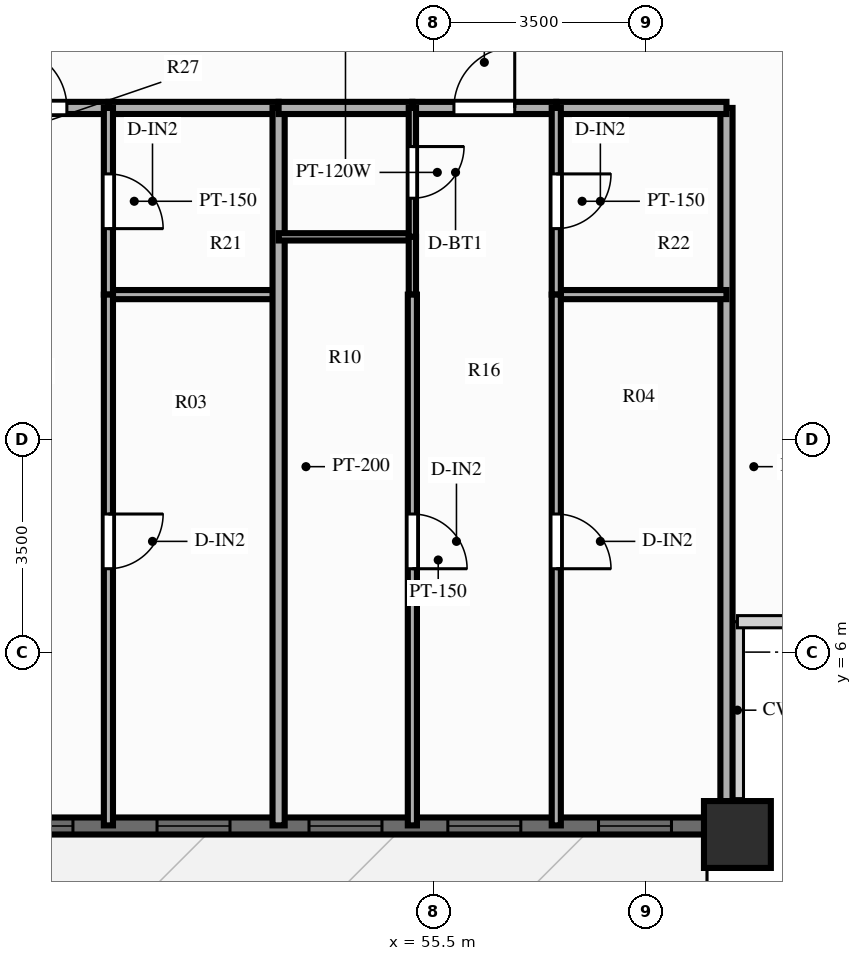
"""IFC4 building model, lengths in metres.
Left out: names, types, materials, properties, quantities, classifications, styles, units other than length and angle.
Written with IfcOpenShell. Run it as: python <this file> out.ifc"""

import sys

from ifc_helpers import new_model, si_unit, direction, frame, frame_2d, origin, origin_2d, place, context, subcontext, project, spatial, rectangle, extrude, source, transform, mapped, element, fill, save


model = new_model("IFC4")
c1 = context("Model", 3, precision=1e-05, world=origin(), true_north=direction((0.0, 1.0)))
c2 = subcontext(c1, "Body", "Model", "MODEL_VIEW")
j1 = project(units=[si_unit("LENGTHUNIT", "METRE"), si_unit("PLANEANGLEUNIT", "RADIAN")], contexts=[c1])
p1 = place(None, origin())
s1 = spatial("IfcSite", under=j1, at=p1, CompositionType="ELEMENT")
p2 = place(p1, origin())
s2 = spatial("IfcBuilding", under=s1, at=p2, CompositionType="ELEMENT")
p3 = place(p2, frame((0.0, 0.0, 25.4)))
s3 = spatial("IfcBuildingStorey", under=s2, at=p3, CompositionType="ELEMENT", Elevation=25.4)
m1 = source(origin(), c2, "Body", "SweptSolid", [
    extrude(rectangle(XDim=1.1, YDim=1.1, at=origin_2d()), origin(), (0.0, 0.0, 1.0), 3.0),
])
p4 = place(p3, frame((60.5, 3.0, 0.0), z_axis=(0.0, 0.0, 1.0), x_axis=(1.0, 0.0, 0.0)))
e1 = element("IfcColumn", 1, at=p4, inside=s3, PredefinedType="COLUMN", context=c2, shape_type="MappedRepresentation", body=[
    mapped(m1, transform((0.0, 0.0, 0.0), scale=1.0)),
])
p5 = place(p3, frame((15.5, 3.14, 0.0), z_axis=(0.0, 0.0, 1.0), x_axis=(1.0, 0.0, 0.0)))
e2 = element("IfcWall", 2, at=p5, inside=s3, PredefinedType="SOLIDWALL", context=c2, shape_type="SweptSolid", body=[
    extrude(rectangle(XDim=45.0, YDim=0.28, at=frame_2d((22.5, 0.0))), origin(), (0.0, 0.0, 1.0), 2.28),
])
p6 = place(p5, frame((0.785, 0.0, 0.25)))
e3 = element("IfcOpeningElement", 3, at=p6, cuts=e2, PredefinedType="OPENING", context=c2, shape_type="SweptSolid", body=[
    extrude(rectangle(XDim=1.2, YDim=1.5, at=frame_2d((0.6, 0.75))), frame((0.0, 0.152, 0.0), z_axis=(0.0, -1.0, 0.0), x_axis=(1.0, 0.0, 0.0)), (0.0, 0.0, 1.0), 0.304),
])
p7 = place(p5, frame((3.033, 0.0, 0.25)))
e4 = element("IfcOpeningElement", 4, at=p7, cuts=e2, PredefinedType="OPENING", context=c2, shape_type="SweptSolid", body=[
    extrude(rectangle(XDim=1.2, YDim=1.5, at=frame_2d((0.6, 0.75))), frame((0.0, 0.152, 0.0), z_axis=(0.0, -1.0, 0.0), x_axis=(1.0, 0.0, 0.0)), (0.0, 0.0, 1.0), 0.304),
])
p8 = place(p5, frame((5.727, 0.0, 0.25)))
e5 = element("IfcOpeningElement", 5, at=p8, cuts=e2, PredefinedType="OPENING", context=c2, shape_type="SweptSolid", body=[
    extrude(rectangle(XDim=1.2, YDim=1.5, at=frame_2d((0.6, 0.75))), frame((0.0, 0.152, 0.0), z_axis=(0.0, -1.0, 0.0), x_axis=(1.0, 0.0, 0.0)), (0.0, 0.0, 1.0), 0.304),
])
p9 = place(p5, frame((8.269, 0.0, 0.25)))
e6 = element("IfcOpeningElement", 6, at=p9, cuts=e2, PredefinedType="OPENING", context=c2, shape_type="SweptSolid", body=[
    extrude(rectangle(XDim=1.2, YDim=1.5, at=frame_2d((0.6, 0.75))), frame((0.0, 0.152, 0.0), z_axis=(0.0, -1.0, 0.0), x_axis=(1.0, 0.0, 0.0)), (0.0, 0.0, 1.0), 0.304),
])
p10 = place(p5, frame((10.621, 0.0, 0.25)))
e7 = element("IfcOpeningElement", 7, at=p10, cuts=e2, PredefinedType="OPENING", context=c2, shape_type="SweptSolid", body=[
    extrude(rectangle(XDim=1.2, YDim=1.5, at=frame_2d((0.6, 0.75))), frame((0.0, 0.152, 0.0), z_axis=(0.0, -1.0, 0.0), x_axis=(1.0, 0.0, 0.0)), (0.0, 0.0, 1.0), 0.304),
])
p11 = place(p5, frame((13.316, 0.0, 0.25)))
e8 = element("IfcOpeningElement", 8, at=p11, cuts=e2, PredefinedType="OPENING", context=c2, shape_type="SweptSolid", body=[
    extrude(rectangle(XDim=1.2, YDim=1.5, at=frame_2d((0.6, 0.75))), frame((0.0, 0.152, 0.0), z_axis=(0.0, -1.0, 0.0), x_axis=(1.0, 0.0, 0.0)), (0.0, 0.0, 1.0), 0.304),
])
p12 = place(p5, frame((16.624, 0.0, 0.25)))
e9 = element("IfcOpeningElement", 9, at=p12, cuts=e2, PredefinedType="OPENING", context=c2, shape_type="SweptSolid", body=[
    extrude(rectangle(XDim=0.7, YDim=1.5, at=frame_2d((0.35, 0.75))), frame((0.0, 0.152, 0.0), z_axis=(0.0, -1.0, 0.0), x_axis=(1.0, 0.0, 0.0)), (0.0, 0.0, 1.0), 0.304),
])
p13 = place(p5, frame((18.141, 0.0, 0.25)))
e10 = element("IfcOpeningElement", 10, at=p13, cuts=e2, PredefinedType="OPENING", context=c2, shape_type="SweptSolid", body=[
    extrude(rectangle(XDim=1.2, YDim=1.5, at=frame_2d((0.6, 0.75))), frame((0.0, 0.152, 0.0), z_axis=(0.0, -1.0, 0.0), x_axis=(1.0, 0.0, 0.0)), (0.0, 0.0, 1.0), 0.304),
])
p14 = place(p5, frame((21.874, 0.0, 0.0), z_axis=(0.0, 0.0, 1.0), x_axis=(-1.0, 0.0, 0.0)))
e11 = element("IfcOpeningElement", 11, at=p14, cuts=e2, PredefinedType="OPENING", context=c2, shape_type="SweptSolid", body=[
    extrude(rectangle(XDim=1.1, YDim=2.15, at=frame_2d((0.55, 1.075))), frame((0.0, 0.152, 0.0), z_axis=(0.0, -1.0, 0.0), x_axis=(1.0, 0.0, 0.0)), (0.0, 0.0, 1.0), 0.304),
])
p15 = place(p5, frame((23.223, 0.0, 0.25)))
e12 = element("IfcOpeningElement", 12, at=p15, cuts=e2, PredefinedType="OPENING", context=c2, shape_type="SweptSolid", body=[
    extrude(rectangle(XDim=1.2, YDim=1.5, at=frame_2d((0.6, 0.75))), frame((0.0, 0.152, 0.0), z_axis=(0.0, -1.0, 0.0), x_axis=(1.0, 0.0, 0.0)), (0.0, 0.0, 1.0), 0.304),
])
p16 = place(p5, frame((25.507, 0.0, 0.25)))
e13 = element("IfcOpeningElement", 13, at=p16, cuts=e2, PredefinedType="OPENING", context=c2, shape_type="SweptSolid", body=[
    extrude(rectangle(XDim=1.2, YDim=1.5, at=frame_2d((0.6, 0.75))), frame((0.0, 0.152, 0.0), z_axis=(0.0, -1.0, 0.0), x_axis=(1.0, 0.0, 0.0)), (0.0, 0.0, 1.0), 0.304),
])
p17 = place(p5, frame((27.6, 0.0, 0.25)))
e14 = element("IfcOpeningElement", 14, at=p17, cuts=e2, PredefinedType="OPENING", context=c2, shape_type="SweptSolid", body=[
    extrude(rectangle(XDim=0.7, YDim=1.5, at=frame_2d((0.35, 0.75))), frame((0.0, 0.152, 0.0), z_axis=(0.0, -1.0, 0.0), x_axis=(1.0, 0.0, 0.0)), (0.0, 0.0, 1.0), 0.304),
])
p18 = place(p5, frame((30.589, 0.0, 0.25)))
e15 = element("IfcOpeningElement", 15, at=p18, cuts=e2, PredefinedType="OPENING", context=c2, shape_type="SweptSolid", body=[
    extrude(rectangle(XDim=1.2, YDim=1.5, at=frame_2d((0.6, 0.75))), frame((0.0, 0.152, 0.0), z_axis=(0.0, -1.0, 0.0), x_axis=(1.0, 0.0, 0.0)), (0.0, 0.0, 1.0), 0.304),
])
p19 = place(p5, frame((32.872, 0.0, 0.25)))
e16 = element("IfcOpeningElement", 16, at=p19, cuts=e2, PredefinedType="OPENING", context=c2, shape_type="SweptSolid", body=[
    extrude(rectangle(XDim=1.2, YDim=1.5, at=frame_2d((0.6, 0.75))), frame((0.0, 0.152, 0.0), z_axis=(0.0, -1.0, 0.0), x_axis=(1.0, 0.0, 0.0)), (0.0, 0.0, 1.0), 0.304),
])
p20 = place(p5, frame((35.455, 0.0, 0.25)))
e17 = element("IfcOpeningElement", 17, at=p20, cuts=e2, PredefinedType="OPENING", context=c2, shape_type="SweptSolid", body=[
    extrude(rectangle(XDim=1.2, YDim=1.5, at=frame_2d((0.6, 0.75))), frame((0.0, 0.152, 0.0), z_axis=(0.0, -1.0, 0.0), x_axis=(1.0, 0.0, 0.0)), (0.0, 0.0, 1.0), 0.304),
])
p21 = place(p5, frame((37.954, 0.0, 0.25)))
e18 = element("IfcOpeningElement", 18, at=p21, cuts=e2, PredefinedType="OPENING", context=c2, shape_type="SweptSolid", body=[
    extrude(rectangle(XDim=1.2, YDim=1.5, at=frame_2d((0.6, 0.75))), frame((0.0, 0.152, 0.0), z_axis=(0.0, -1.0, 0.0), x_axis=(1.0, 0.0, 0.0)), (0.0, 0.0, 1.0), 0.304),
])
p22 = place(p5, frame((40.238, 0.0, 0.25)))
e19 = element("IfcOpeningElement", 19, at=p22, cuts=e2, PredefinedType="OPENING", context=c2, shape_type="SweptSolid", body=[
    extrude(rectangle(XDim=1.2, YDim=1.5, at=frame_2d((0.6, 0.75))), frame((0.0, 0.152, 0.0), z_axis=(0.0, -1.0, 0.0), x_axis=(1.0, 0.0, 0.0)), (0.0, 0.0, 1.0), 0.304),
])
p23 = place(p5, frame((42.716, 0.0, 0.25)))
e20 = element("IfcOpeningElement", 20, at=p23, cuts=e2, PredefinedType="OPENING", context=c2, shape_type="SweptSolid", body=[
    extrude(rectangle(XDim=1.2, YDim=1.5, at=frame_2d((0.6, 0.75))), frame((0.0, 0.152, 0.0), z_axis=(0.0, -1.0, 0.0), x_axis=(1.0, 0.0, 0.0)), (0.0, 0.0, 1.0), 0.304),
])
p24 = place(p3, frame((60.32, 14.95, 0.0), z_axis=(0.0, 0.0, 1.0), x_axis=(0.0, -1.0, 0.0)))
e21 = element("IfcWall", 21, at=p24, inside=s3, PredefinedType="PARTITIONING", context=c2, shape_type="SweptSolid", body=[
    extrude(rectangle(XDim=11.8, YDim=0.2, at=frame_2d((5.9, 0.0))), origin(), (0.0, 0.0, 1.0), 2.79),
])
p25 = place(p3, frame((47.789, 14.95, 0.0), z_axis=(0.0, 0.0, 1.0), x_axis=(1.0, 0.0, 0.0)))
e22 = element("IfcWall", 22, at=p25, inside=s3, PredefinedType="PARTITIONING", context=c2, shape_type="SweptSolid", body=[
    extrude(rectangle(XDim=2.367, YDim=0.2, at=frame_2d((1.183, 0.0))), origin(), (0.0, 0.0, 1.0), 2.79),
])
p26 = place(p25, frame((0.683, 0.0, 0.0)))
e23 = element("IfcOpeningElement", 23, at=p26, cuts=e22, PredefinedType="OPENING", context=c2, shape_type="SweptSolid", body=[
    extrude(rectangle(XDim=1.0, YDim=2.15, at=frame_2d((0.5, 1.075))), frame((0.0, 0.112, 0.0), z_axis=(0.0, -1.0, 0.0), x_axis=(1.0, 0.0, 0.0)), (0.0, 0.0, 1.0), 0.224),
])
p27 = place(p3, frame((50.156, 14.95, 0.0), z_axis=(0.0, 0.0, 1.0), x_axis=(1.0, 0.0, 0.0)))
e24 = element("IfcWall", 24, at=p27, inside=s3, PredefinedType="PARTITIONING", context=c2, shape_type="SweptSolid", body=[
    extrude(rectangle(XDim=2.799, YDim=0.2, at=frame_2d((1.399, 0.0))), origin(), (0.0, 0.0, 1.0), 2.79),
])
p28 = place(p3, frame((50.156, 11.88, 0.0), z_axis=(0.0, 0.0, 1.0), x_axis=(1.0, 0.0, 0.0)))
e25 = element("IfcWall", 25, at=p28, inside=s3, PredefinedType="PARTITIONING", context=c2, shape_type="SweptSolid", body=[
    extrude(rectangle(XDim=2.799, YDim=0.15, at=frame_2d((1.399, 0.0))), origin(), (0.0, 0.0, 1.0), 2.79),
])
p29 = place(p3, frame((50.156, 14.95, 0.0), z_axis=(0.0, 0.0, 1.0), x_axis=(0.0, -1.0, 0.0)))
e26 = element("IfcWall", 26, at=p29, inside=s3, PredefinedType="PARTITIONING", context=c2, shape_type="SweptSolid", body=[
    extrude(rectangle(XDim=3.07, YDim=0.15, at=frame_2d((1.535, 0.0))), origin(), (0.0, 0.0, 1.0), 2.79),
])
p30 = place(p29, frame((1.085, 0.0, 0.0)))
e27 = element("IfcOpeningElement", 27, at=p30, cuts=e26, PredefinedType="OPENING", context=c2, shape_type="SweptSolid", body=[
    extrude(rectangle(XDim=0.9, YDim=2.1, at=frame_2d((0.45, 1.05))), frame((0.0, 0.087, 0.0), z_axis=(0.0, -1.0, 0.0), x_axis=(1.0, 0.0, 0.0)), (0.0, 0.0, 1.0), 0.174),
])
p31 = place(p3, frame((50.156, 11.88, 0.0), z_axis=(0.0, 0.0, 1.0), x_axis=(0.0, -1.0, 0.0)))
e28 = element("IfcWall", 28, at=p31, inside=s3, PredefinedType="PARTITIONING", context=c2, shape_type="SweptSolid", body=[
    extrude(rectangle(XDim=8.73, YDim=0.15, at=frame_2d((4.365, 0.0))), origin(), (0.0, 0.0, 1.0), 2.79),
])
p32 = place(p31, frame((3.609, 0.0, 0.0)))
e29 = element("IfcOpeningElement", 29, at=p32, cuts=e28, PredefinedType="OPENING", context=c2, shape_type="SweptSolid", body=[
    extrude(rectangle(XDim=0.9, YDim=2.1, at=frame_2d((0.45, 1.05))), frame((0.0, 0.087, 0.0), z_axis=(0.0, -1.0, 0.0), x_axis=(1.0, 0.0, 0.0)), (0.0, 0.0, 1.0), 0.174),
])
p33 = place(p3, frame((52.954, 14.95, 0.0), z_axis=(0.0, 0.0, 1.0), x_axis=(0.0, -1.0, 0.0)))
e30 = element("IfcWall", 30, at=p33, inside=s3, PredefinedType="PARTITIONING", context=c2, shape_type="SweptSolid", body=[
    extrude(rectangle(XDim=11.8, YDim=0.2, at=frame_2d((5.9, 0.0))), origin(), (0.0, 0.0, 1.0), 2.79),
])
p34 = place(p3, frame((52.954, 14.95, 0.0), z_axis=(0.0, 0.0, 1.0), x_axis=(1.0, 0.0, 0.0)))
e31 = element("IfcWall", 31, at=p34, inside=s3, PredefinedType="PARTITIONING", context=c2, shape_type="SweptSolid", body=[
    extrude(rectangle(XDim=2.2, YDim=0.2, at=frame_2d((1.1, 0.0))), origin(), (0.0, 0.0, 1.0), 2.79),
])
p35 = place(p3, frame((55.154, 14.95, 0.0), z_axis=(0.0, 0.0, 1.0), x_axis=(1.0, 0.0, 0.0)))
e32 = element("IfcWall", 32, at=p35, inside=s3, PredefinedType="PARTITIONING", context=c2, shape_type="SweptSolid", body=[
    extrude(rectangle(XDim=2.367, YDim=0.2, at=frame_2d((1.183, 0.0))), origin(), (0.0, 0.0, 1.0), 2.79),
])
p36 = place(p35, frame((0.683, 0.0, 0.0)))
e33 = element("IfcOpeningElement", 33, at=p36, cuts=e32, PredefinedType="OPENING", context=c2, shape_type="SweptSolid", body=[
    extrude(rectangle(XDim=1.0, YDim=2.15, at=frame_2d((0.5, 1.075))), frame((0.0, 0.112, 0.0), z_axis=(0.0, -1.0, 0.0), x_axis=(1.0, 0.0, 0.0)), (0.0, 0.0, 1.0), 0.224),
])
p37 = place(p3, frame((57.521, 14.95, 0.0), z_axis=(0.0, 0.0, 1.0), x_axis=(1.0, 0.0, 0.0)))
e34 = element("IfcWall", 34, at=p37, inside=s3, PredefinedType="PARTITIONING", context=c2, shape_type="SweptSolid", body=[
    extrude(rectangle(XDim=2.799, YDim=0.2, at=frame_2d((1.399, 0.0))), origin(), (0.0, 0.0, 1.0), 2.79),
])
p38 = place(p3, frame((52.954, 12.83, 0.0), z_axis=(0.0, 0.0, 1.0), x_axis=(1.0, 0.0, 0.0)))
e35 = element("IfcWall", 35, at=p38, inside=s3, PredefinedType="PARTITIONING", context=c2, shape_type="SweptSolid", body=[
    extrude(rectangle(XDim=2.2, YDim=0.12, at=frame_2d((1.1, 0.0))), origin(), (0.0, 0.0, 1.0), 2.79),
])
p39 = place(p3, frame((57.521, 11.88, 0.0), z_axis=(0.0, 0.0, 1.0), x_axis=(1.0, 0.0, 0.0)))
e36 = element("IfcWall", 36, at=p39, inside=s3, PredefinedType="PARTITIONING", context=c2, shape_type="SweptSolid", body=[
    extrude(rectangle(XDim=2.799, YDim=0.15, at=frame_2d((1.399, 0.0))), origin(), (0.0, 0.0, 1.0), 2.79),
])
p40 = place(p3, frame((55.154, 14.95, 0.0), z_axis=(0.0, 0.0, 1.0), x_axis=(0.0, -1.0, 0.0)))
e37 = element("IfcWall", 37, at=p40, inside=s3, PredefinedType="PARTITIONING", context=c2, shape_type="SweptSolid", body=[
    extrude(rectangle(XDim=2.12, YDim=0.12, at=frame_2d((1.06, 0.0))), origin(), (0.0, 0.0, 1.0), 2.79),
])
p41 = place(p40, frame((0.635, 0.0, 0.0)))
e38 = element("IfcOpeningElement", 38, at=p41, cuts=e37, PredefinedType="OPENING", context=c2, shape_type="SweptSolid", body=[
    extrude(rectangle(XDim=0.85, YDim=2.05, at=frame_2d((0.425, 1.025))), frame((0.0, 0.072, 0.0), z_axis=(0.0, -1.0, 0.0), x_axis=(1.0, 0.0, 0.0)), (0.0, 0.0, 1.0), 0.144),
])
p42 = place(p3, frame((55.154, 12.83, 0.0), z_axis=(0.0, 0.0, 1.0), x_axis=(0.0, -1.0, 0.0)))
e39 = element("IfcWall", 39, at=p42, inside=s3, PredefinedType="PARTITIONING", context=c2, shape_type="SweptSolid", body=[
    extrude(rectangle(XDim=0.95, YDim=0.12, at=frame_2d((0.475, 0.0))), origin(), (0.0, 0.0, 1.0), 2.79),
])
p43 = place(p3, frame((55.154, 11.88, 0.0), z_axis=(0.0, 0.0, 1.0), x_axis=(0.0, -1.0, 0.0)))
e40 = element("IfcWall", 40, at=p43, inside=s3, PredefinedType="PARTITIONING", context=c2, shape_type="SweptSolid", body=[
    extrude(rectangle(XDim=8.73, YDim=0.15, at=frame_2d((4.365, 0.0))), origin(), (0.0, 0.0, 1.0), 2.79),
])
p44 = place(p43, frame((3.609, 0.0, 0.0)))
e41 = element("IfcOpeningElement", 41, at=p44, cuts=e40, PredefinedType="OPENING", context=c2, shape_type="SweptSolid", body=[
    extrude(rectangle(XDim=0.9, YDim=2.1, at=frame_2d((0.45, 1.05))), frame((0.0, 0.087, 0.0), z_axis=(0.0, -1.0, 0.0), x_axis=(1.0, 0.0, 0.0)), (0.0, 0.0, 1.0), 0.174),
])
p45 = place(p3, frame((57.521, 14.95, 0.0), z_axis=(0.0, 0.0, 1.0), x_axis=(0.0, -1.0, 0.0)))
e42 = element("IfcWall", 42, at=p45, inside=s3, PredefinedType="PARTITIONING", context=c2, shape_type="SweptSolid", body=[
    extrude(rectangle(XDim=3.07, YDim=0.15, at=frame_2d((1.535, 0.0))), origin(), (0.0, 0.0, 1.0), 2.79),
])
p46 = place(p45, frame((1.085, 0.0, 0.0)))
e43 = element("IfcOpeningElement", 43, at=p46, cuts=e42, PredefinedType="OPENING", context=c2, shape_type="SweptSolid", body=[
    extrude(rectangle(XDim=0.9, YDim=2.1, at=frame_2d((0.45, 1.05))), frame((0.0, 0.087, 0.0), z_axis=(0.0, -1.0, 0.0), x_axis=(1.0, 0.0, 0.0)), (0.0, 0.0, 1.0), 0.174),
])
p47 = place(p3, frame((57.521, 11.88, 0.0), z_axis=(0.0, 0.0, 1.0), x_axis=(0.0, -1.0, 0.0)))
e44 = element("IfcWall", 44, at=p47, inside=s3, PredefinedType="PARTITIONING", context=c2, shape_type="SweptSolid", body=[
    extrude(rectangle(XDim=8.73, YDim=0.15, at=frame_2d((4.365, 0.0))), origin(), (0.0, 0.0, 1.0), 2.79),
])
p48 = place(p47, frame((3.609, 0.0, 0.0)))
e45 = element("IfcOpeningElement", 45, at=p48, cuts=e44, PredefinedType="OPENING", context=c2, shape_type="SweptSolid", body=[
    extrude(rectangle(XDim=0.9, YDim=2.1, at=frame_2d((0.45, 1.05))), frame((0.0, 0.087, 0.0), z_axis=(0.0, -1.0, 0.0), x_axis=(1.0, 0.0, 0.0)), (0.0, 0.0, 1.0), 0.174),
])
m2 = source(origin(), c2, "Body", "SweptSolid", [
    extrude(rectangle(XDim=1.2, YDim=1.5, at=frame_2d((0.6, 0.75))), frame((0.0, 0.03, 0.0), z_axis=(0.0, -1.0, 0.0), x_axis=(1.0, 0.0, 0.0)), (0.0, 0.0, 1.0), 0.06),
])
p49 = place(p19, origin())
e46 = element("IfcWindow", 46, at=p49, inside=s3, PartitioningType="SINGLE_PANEL", PredefinedType="WINDOW", context=c2, shape_type="MappedRepresentation", body=[
    mapped(m2, transform((0.0, 0.0, 0.0), scale=1.0)),
])
fill(e16, e46)
p50 = place(p20, origin())
e47 = element("IfcWindow", 47, at=p50, inside=s3, PartitioningType="SINGLE_PANEL", PredefinedType="WINDOW", context=c2, shape_type="MappedRepresentation", body=[
    mapped(m2, transform((0.0, 0.0, 0.0), scale=1.0)),
])
fill(e17, e47)
p51 = place(p21, origin())
e48 = element("IfcWindow", 48, at=p51, inside=s3, PartitioningType="SINGLE_PANEL", PredefinedType="WINDOW", context=c2, shape_type="MappedRepresentation", body=[
    mapped(m2, transform((0.0, 0.0, 0.0), scale=1.0)),
])
fill(e18, e48)
p52 = place(p22, origin())
e49 = element("IfcWindow", 49, at=p52, inside=s3, PartitioningType="SINGLE_PANEL", PredefinedType="WINDOW", context=c2, shape_type="MappedRepresentation", body=[
    mapped(m2, transform((0.0, 0.0, 0.0), scale=1.0)),
])
fill(e19, e49)
p53 = place(p23, origin())
e50 = element("IfcWindow", 50, at=p53, inside=s3, PartitioningType="SINGLE_PANEL", PredefinedType="WINDOW", context=c2, shape_type="MappedRepresentation", body=[
    mapped(m2, transform((0.0, 0.0, 0.0), scale=1.0)),
])
fill(e20, e50)
m3 = source(origin(), c2, "Body", "SweptSolid", [
    extrude(rectangle(XDim=1.0, YDim=2.15, at=frame_2d((0.5, 1.075))), frame((0.0, 0.025, 0.0), z_axis=(0.0, -1.0, 0.0), x_axis=(1.0, 0.0, 0.0)), (0.0, 0.0, 1.0), 0.05),
])
p54 = place(p26, origin())
e51 = element("IfcDoor", 51, at=p54, inside=s3, OperationType="SINGLE_SWING_LEFT", PredefinedType="DOOR", context=c2, shape_type="MappedRepresentation", body=[
    mapped(m3, transform((0.0, 0.0, 0.0), scale=1.0)),
])
fill(e23, e51)
m4 = source(origin(), c2, "Body", "SweptSolid", [
    extrude(rectangle(XDim=0.9, YDim=2.1, at=frame_2d((0.45, 1.05))), frame((0.0, 0.025, 0.0), z_axis=(0.0, -1.0, 0.0), x_axis=(1.0, 0.0, 0.0)), (0.0, 0.0, 1.0), 0.05),
])
p55 = place(p30, origin())
e52 = element("IfcDoor", 52, at=p55, inside=s3, OperationType="SINGLE_SWING_RIGHT", PredefinedType="DOOR", context=c2, shape_type="MappedRepresentation", body=[
    mapped(m4, transform((0.0, 0.0, 0.0), scale=1.0)),
])
fill(e27, e52)
p56 = place(p32, origin())
e53 = element("IfcDoor", 53, at=p56, inside=s3, OperationType="SINGLE_SWING_LEFT", PredefinedType="DOOR", context=c2, shape_type="MappedRepresentation", body=[
    mapped(m4, transform((0.0, 0.0, 0.0), scale=1.0)),
])
fill(e29, e53)
p57 = place(p36, origin())
e54 = element("IfcDoor", 54, at=p57, inside=s3, OperationType="SINGLE_SWING_RIGHT", PredefinedType="DOOR", context=c2, shape_type="MappedRepresentation", body=[
    mapped(m3, transform((0.0, 0.0, 0.0), scale=1.0)),
])
fill(e33, e54)
m5 = source(origin(), c2, "Body", "SweptSolid", [
    extrude(rectangle(XDim=0.85, YDim=2.05, at=frame_2d((0.425, 1.025))), frame((0.0, 0.025, 0.0), z_axis=(0.0, -1.0, 0.0), x_axis=(1.0, 0.0, 0.0)), (0.0, 0.0, 1.0), 0.05),
])
p58 = place(p41, origin())
e55 = element("IfcDoor", 55, at=p58, inside=s3, OperationType="SINGLE_SWING_LEFT", PredefinedType="DOOR", context=c2, shape_type="MappedRepresentation", body=[
    mapped(m5, transform((0.0, 0.0, 0.0), scale=1.0)),
])
fill(e38, e55)
p59 = place(p44, origin())
e56 = element("IfcDoor", 56, at=p59, inside=s3, OperationType="SINGLE_SWING_RIGHT", PredefinedType="DOOR", context=c2, shape_type="MappedRepresentation", body=[
    mapped(m4, transform((0.0, 0.0, 0.0), scale=1.0)),
])
fill(e41, e56)
p60 = place(p46, origin())
e57 = element("IfcDoor", 57, at=p60, inside=s3, OperationType="SINGLE_SWING_LEFT", PredefinedType="DOOR", context=c2, shape_type="MappedRepresentation", body=[
    mapped(m4, transform((0.0, 0.0, 0.0), scale=1.0)),
])
fill(e43, e57)
p61 = place(p48, origin())
e58 = element("IfcDoor", 58, at=p61, inside=s3, OperationType="SINGLE_SWING_RIGHT", PredefinedType="DOOR", context=c2, shape_type="MappedRepresentation", body=[
    mapped(m4, transform((0.0, 0.0, 0.0), scale=1.0)),
])
fill(e45, e58)
save(model, sys.argv[1])
